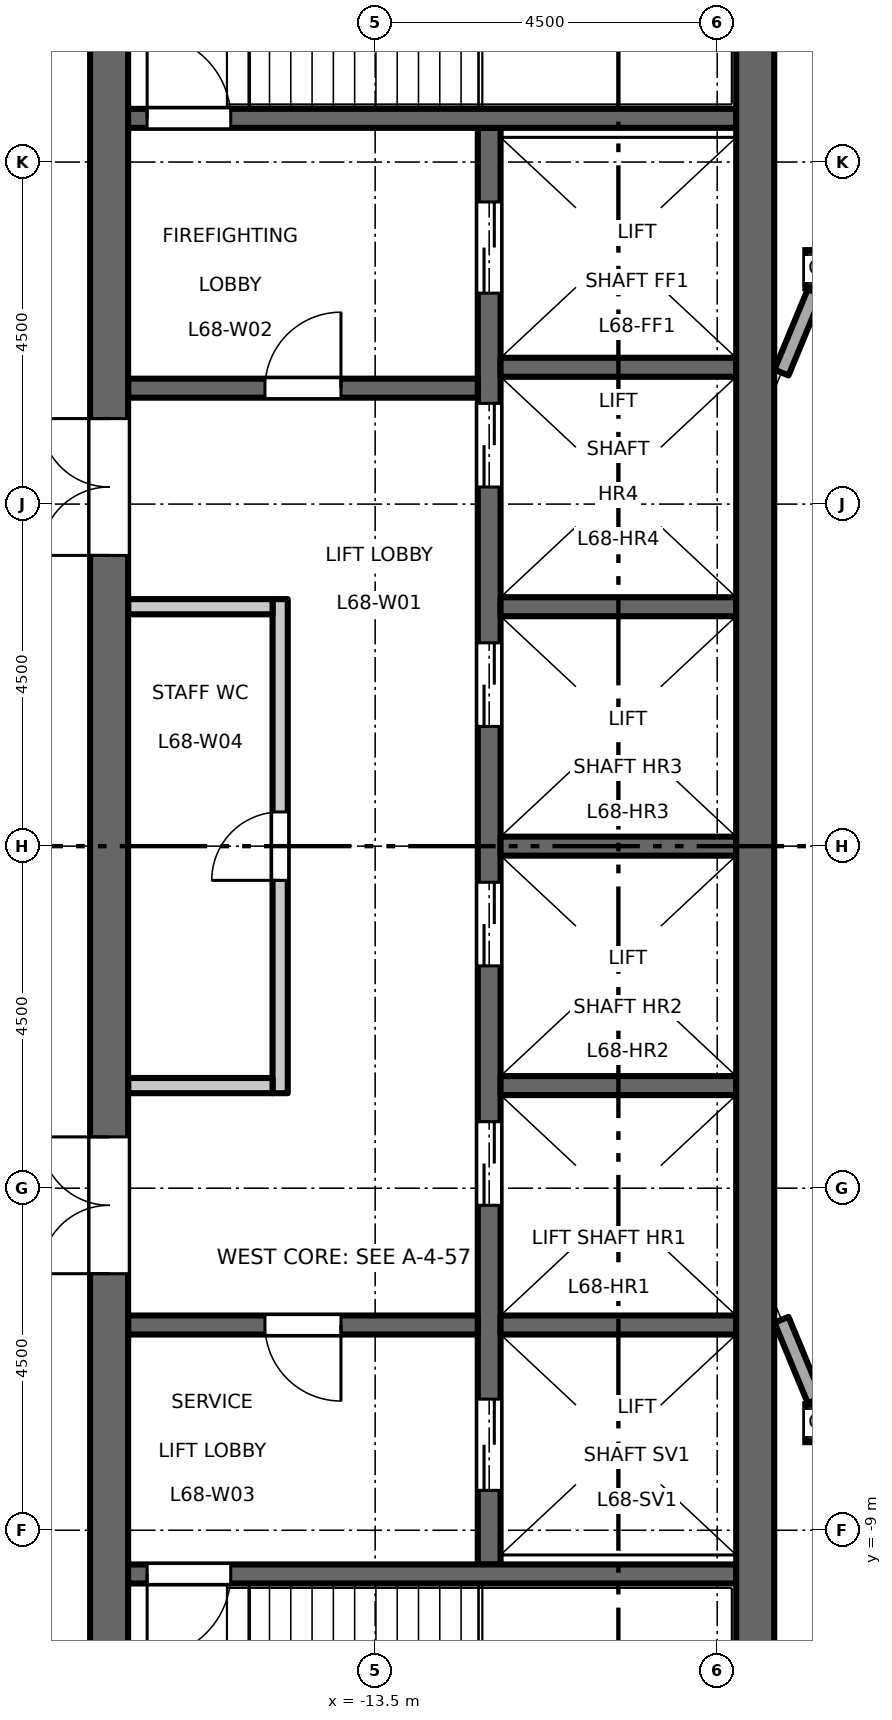
"""IFC4 building model, lengths in metres.
Left out: names, types, materials, properties, quantities, classifications, styles, units other than length and angle.
Written with IfcOpenShell. Run it as: python <this file> out.ifc"""

import sys

from ifc_helpers import new_model, si_unit, direction, frame, frame_2d, origin, origin_2d, place, context, subcontext, project, spatial, rectangle, hollow_rectangle, extrude, element, fill, save


model = new_model("IFC4")
c1 = context("Model", 3, precision=1e-05, world=origin(), true_north=direction((0.0, 1.0)))
c2 = subcontext(c1, "Body", "Model", "MODEL_VIEW")
j1 = project(units=[si_unit("LENGTHUNIT", "METRE"), si_unit("PLANEANGLEUNIT", "RADIAN")], contexts=[c1])
p1 = place(None, origin())
s1 = spatial("IfcSite", under=j1, at=p1, CompositionType="ELEMENT")
p2 = place(p1, origin())
s2 = spatial("IfcBuilding", under=s1, at=p2, CompositionType="ELEMENT")
p3 = place(p2, frame((0.0, 0.0, 316.7)))
s3 = spatial("IfcBuildingStorey", under=s2, at=p3, CompositionType="ELEMENT", Elevation=316.7)
for number, where, z_axis, x_axis in (
    (1, (-7.591, -7.591, 0.0), (0.0, 0.0, 1.0), (1.0, 0.0, 0.0)),
    (2, (-7.591, 7.591, 0.0), (0.0, 0.0, 1.0), (1.0, 0.0, 0.0)),
):
    element("IfcColumn", number, at=place(p3, frame(where, z_axis=z_axis, x_axis=x_axis)), inside=s3, PredefinedType="COLUMN", context=c2, shape_type="SweptSolid", body=[
        extrude(hollow_rectangle(XDim=0.5, YDim=0.5, WallThickness=0.025, at=origin_2d()), origin(), (0.0, 0.0, 1.0), 4.5),
    ])
p4 = place(p3, frame((-14.75, -3.25, 0.0), z_axis=(0.0, 0.0, 1.0), x_axis=(0.0, 1.0, 0.0)))
e3 = element("IfcWall", 3, at=p4, inside=s3, PredefinedType="PARTITIONING", context=c2, shape_type="SweptSolid", body=[
    extrude(rectangle(XDim=6.5, YDim=0.2, at=frame_2d((3.25, 0.0))), origin(), (0.0, 0.0, 1.0), 4.35),
])
p5 = place(p4, frame((2.8, 0.0, 0.0)))
e4 = element("IfcOpeningElement", 4, at=p5, cuts=e3, PredefinedType="OPENING", context=c2, shape_type="SweptSolid", body=[
    extrude(rectangle(XDim=0.9, YDim=2.1, at=frame_2d((0.45, 1.05))), frame((0.0, 0.11, 0.0), z_axis=(0.0, -1.0, 0.0), x_axis=(1.0, 0.0, 0.0)), (0.0, 0.0, 1.0), 0.22),
])
for number, where, z_axis, x_axis in (
    (5, (-14.85, 3.15, 0.0), (0.0, 0.0, 1.0), (-1.0, 0.0, 0.0)),
    (6, (-14.85, -3.15, 0.0), (0.0, 0.0, 1.0), (-1.0, 0.0, 0.0)),
):
    element("IfcWall", number, at=place(p3, frame(where, z_axis=z_axis, x_axis=x_axis)), inside=s3, PredefinedType="PARTITIONING", context=c2, shape_type="SweptSolid", body=[
        extrude(rectangle(XDim=1.9, YDim=0.2, at=frame_2d((0.95, 0.0))), origin(), (0.0, 0.0, 1.0), 4.35),
    ])
p6 = place(p3, frame((-12.0, -9.45, 0.0), z_axis=(0.0, 0.0, 1.0), x_axis=(0.0, 1.0, 0.0)))
e7 = element("IfcWall", 7, at=p6, inside=s3, PredefinedType="SHEAR", context=c2, shape_type="SweptSolid", body=[
    extrude(rectangle(XDim=18.9, YDim=0.3, at=frame_2d((9.45, 0.0))), origin(), (0.0, 0.0, 1.0), 4.35),
])
p7 = place(p6, frame((4.725, 0.0, 0.0)))
e8 = element("IfcOpeningElement", 8, at=p7, cuts=e7, PredefinedType="OPENING", context=c2, shape_type="SweptSolid", body=[
    extrude(rectangle(XDim=1.1, YDim=2.1, at=frame_2d((0.55, 1.05))), frame((0.0, 0.16, 0.0), z_axis=(0.0, -1.0, 0.0), x_axis=(1.0, 0.0, 0.0)), (0.0, 0.0, 1.0), 0.32),
])
p8 = place(p6, frame((7.875, 0.0, 0.0)))
e9 = element("IfcOpeningElement", 9, at=p8, cuts=e7, PredefinedType="OPENING", context=c2, shape_type="SweptSolid", body=[
    extrude(rectangle(XDim=1.1, YDim=2.1, at=frame_2d((0.55, 1.05))), frame((0.0, 0.16, 0.0), z_axis=(0.0, -1.0, 0.0), x_axis=(1.0, 0.0, 0.0)), (0.0, 0.0, 1.0), 0.32),
])
p9 = place(p6, frame((11.025, 0.0, 0.0)))
e10 = element("IfcOpeningElement", 10, at=p9, cuts=e7, PredefinedType="OPENING", context=c2, shape_type="SweptSolid", body=[
    extrude(rectangle(XDim=1.1, YDim=2.1, at=frame_2d((0.55, 1.05))), frame((0.0, 0.16, 0.0), z_axis=(0.0, -1.0, 0.0), x_axis=(1.0, 0.0, 0.0)), (0.0, 0.0, 1.0), 0.32),
])
p10 = place(p6, frame((14.175, 0.0, 0.0)))
e11 = element("IfcOpeningElement", 11, at=p10, cuts=e7, PredefinedType="OPENING", context=c2, shape_type="SweptSolid", body=[
    extrude(rectangle(XDim=1.1, YDim=2.1, at=frame_2d((0.55, 1.05))), frame((0.0, 0.16, 0.0), z_axis=(0.0, -1.0, 0.0), x_axis=(1.0, 0.0, 0.0)), (0.0, 0.0, 1.0), 0.32),
])
p11 = place(p6, frame((16.725, 0.0, 0.0)))
e12 = element("IfcOpeningElement", 12, at=p11, cuts=e7, PredefinedType="OPENING", context=c2, shape_type="SweptSolid", body=[
    extrude(rectangle(XDim=1.2, YDim=2.1, at=frame_2d((0.6, 1.05))), frame((0.0, 0.16, 0.0), z_axis=(0.0, -1.0, 0.0), x_axis=(1.0, 0.0, 0.0)), (0.0, 0.0, 1.0), 0.32),
])
p12 = place(p6, frame((0.975, 0.0, 0.0)))
e13 = element("IfcOpeningElement", 13, at=p12, cuts=e7, PredefinedType="OPENING", context=c2, shape_type="SweptSolid", body=[
    extrude(rectangle(XDim=1.2, YDim=2.1, at=frame_2d((0.6, 1.05))), frame((0.0, 0.16, 0.0), z_axis=(0.0, -1.0, 0.0), x_axis=(1.0, 0.0, 0.0)), (0.0, 0.0, 1.0), 0.32),
])
p13 = place(p3, frame((-12.15, 6.025, 0.0), z_axis=(0.0, 0.0, 1.0), x_axis=(-1.0, 0.0, 0.0)))
e14 = element("IfcWall", 14, at=p13, inside=s3, PredefinedType="SHEAR", context=c2, shape_type="SweptSolid", body=[
    extrude(rectangle(XDim=4.6, YDim=0.25, at=frame_2d((2.3, 0.0))), origin(), (0.0, 0.0, 1.0), 4.35),
])
p14 = place(p13, frame((1.8, 0.0, 0.0)))
e15 = element("IfcOpeningElement", 15, at=p14, cuts=e14, PredefinedType="OPENING", context=c2, shape_type="SweptSolid", body=[
    extrude(rectangle(XDim=1.0, YDim=2.1, at=frame_2d((0.5, 1.05))), frame((0.0, 0.135, 0.0), z_axis=(0.0, -1.0, 0.0), x_axis=(1.0, 0.0, 0.0)), (0.0, 0.0, 1.0), 0.27),
])
p15 = place(p3, frame((-12.15, -6.3, 0.0), z_axis=(0.0, 0.0, 1.0), x_axis=(-1.0, 0.0, 0.0)))
e16 = element("IfcWall", 16, at=p15, inside=s3, PredefinedType="SHEAR", context=c2, shape_type="SweptSolid", body=[
    extrude(rectangle(XDim=4.6, YDim=0.25, at=frame_2d((2.3, 0.0))), origin(), (0.0, 0.0, 1.0), 4.35),
])
p16 = place(p15, frame((1.8, 0.0, 0.0)))
e17 = element("IfcOpeningElement", 17, at=p16, cuts=e16, PredefinedType="OPENING", context=c2, shape_type="SweptSolid", body=[
    extrude(rectangle(XDim=1.0, YDim=2.1, at=frame_2d((0.5, 1.05))), frame((0.0, 0.135, 0.0), z_axis=(0.0, -1.0, 0.0), x_axis=(1.0, 0.0, 0.0)), (0.0, 0.0, 1.0), 0.27),
])
p17 = place(p3, frame((-17.0, -13.0, 0.0), z_axis=(0.0, 0.0, 1.0), x_axis=(0.0, 1.0, 0.0)))
e18 = element("IfcWall", 18, at=p17, inside=s3, PredefinedType="SHEAR", context=c2, shape_type="SweptSolid", body=[
    extrude(rectangle(XDim=26.0, YDim=0.5, at=frame_2d((13.0, 0.0))), origin(), (0.0, 0.0, 1.0), 4.35),
])
p18 = place(p17, frame((16.825, 0.0, 0.0)))
e19 = element("IfcOpeningElement", 19, at=p18, cuts=e18, PredefinedType="OPENING", context=c2, shape_type="SweptSolid", body=[
    extrude(rectangle(XDim=1.8, YDim=2.1, at=frame_2d((0.9, 1.05))), frame((0.0, 0.26, 0.0), z_axis=(0.0, -1.0, 0.0), x_axis=(1.0, 0.0, 0.0)), (0.0, 0.0, 1.0), 0.52),
])
p19 = place(p17, frame((7.375, 0.0, 0.0)))
e20 = element("IfcOpeningElement", 20, at=p19, cuts=e18, PredefinedType="OPENING", context=c2, shape_type="SweptSolid", body=[
    extrude(rectangle(XDim=1.8, YDim=2.1, at=frame_2d((0.9, 1.05))), frame((0.0, 0.26, 0.0), z_axis=(0.0, -1.0, 0.0), x_axis=(1.0, 0.0, 0.0)), (0.0, 0.0, 1.0), 0.52),
])
for number, where, z_axis, x_axis in (
    (21, (-8.75, 0.0, 0.0), (0.0, 0.0, 1.0), (-1.0, 0.0, 0.0)),
    (22, (-8.75, 3.15, 0.0), (0.0, 0.0, 1.0), (-1.0, 0.0, 0.0)),
    (23, (-8.75, 6.3, 0.0), (0.0, 0.0, 1.0), (-1.0, 0.0, 0.0)),
    (24, (-8.75, -3.15, 0.0), (0.0, 0.0, 1.0), (-1.0, 0.0, 0.0)),
    (25, (-8.75, -6.3, 0.0), (0.0, 0.0, 1.0), (-1.0, 0.0, 0.0)),
):
    element("IfcWall", number, at=place(p3, frame(where, z_axis=z_axis, x_axis=x_axis)), inside=s3, PredefinedType="SHEAR", context=c2, shape_type="SweptSolid", body=[
        extrude(rectangle(XDim=3.1, YDim=0.25, at=frame_2d((1.55, 0.0))), origin(), (0.0, 0.0, 1.0), 4.35),
    ])
p20 = place(p3, frame((-8.75, 9.575, 0.0), z_axis=(0.0, 0.0, 1.0), x_axis=(-1.0, 0.0, 0.0)))
e26 = element("IfcWall", 26, at=p20, inside=s3, PredefinedType="SHEAR", context=c2, shape_type="SweptSolid", body=[
    extrude(rectangle(XDim=8.0, YDim=0.25, at=frame_2d((4.0, 0.0))), origin(), (0.0, 0.0, 1.0), 4.35),
])
p21 = place(p20, frame((6.65, 0.0, 0.0)))
e27 = element("IfcOpeningElement", 27, at=p21, cuts=e26, PredefinedType="OPENING", context=c2, shape_type="SweptSolid", body=[
    extrude(rectangle(XDim=1.1, YDim=2.1, at=frame_2d((0.55, 1.05))), frame((0.0, 0.135, 0.0), z_axis=(0.0, -1.0, 0.0), x_axis=(1.0, 0.0, 0.0)), (0.0, 0.0, 1.0), 0.27),
])
p22 = place(p3, frame((-8.75, -9.575, 0.0), z_axis=(0.0, 0.0, 1.0), x_axis=(-1.0, 0.0, 0.0)))
e28 = element("IfcWall", 28, at=p22, inside=s3, PredefinedType="SHEAR", context=c2, shape_type="SweptSolid", body=[
    extrude(rectangle(XDim=8.0, YDim=0.25, at=frame_2d((4.0, 0.0))), origin(), (0.0, 0.0, 1.0), 4.35),
])
p23 = place(p22, frame((6.65, 0.0, 0.0)))
e29 = element("IfcOpeningElement", 29, at=p23, cuts=e28, PredefinedType="OPENING", context=c2, shape_type="SweptSolid", body=[
    extrude(rectangle(XDim=1.1, YDim=2.1, at=frame_2d((0.55, 1.05))), frame((0.0, 0.135, 0.0), z_axis=(0.0, -1.0, 0.0), x_axis=(1.0, 0.0, 0.0)), (0.0, 0.0, 1.0), 0.27),
])
p24 = place(p3, frame((-8.5, -13.0, 0.0), z_axis=(0.0, 0.0, 1.0), x_axis=(0.0, 1.0, 0.0)))
e30 = element("IfcWall", 30, at=p24, inside=s3, PredefinedType="SHEAR", context=c2, shape_type="SweptSolid", body=[
    extrude(rectangle(XDim=26.0, YDim=0.5, at=frame_2d((13.0, 0.0))), origin(), (0.0, 0.0, 1.0), 4.35),
])
for number, where, z_axis, x_axis in (
    (31, (-7.716, 7.289, 0.0), (0.0, 0.0, 1.0), (-0.383, -0.924, 0.0)),
    (32, (-8.154, -6.231, 0.0), (0.0, 0.0, 1.0), (0.383, -0.924, 0.0)),
):
    element("IfcWall", number, at=place(p3, frame(where, z_axis=z_axis, x_axis=x_axis)), inside=s3, PredefinedType="STANDARD", context=c2, shape_type="SweptSolid", body=[
        extrude(rectangle(XDim=1.146, YDim=0.2, at=frame_2d((0.573, 0.0))), origin(), (0.0, 0.0, 1.0), 4.01),
    ])
p25 = place(p14, origin())
e33 = element("IfcDoor", 33, at=p25, inside=s3, OperationType="SINGLE_SWING_LEFT", PredefinedType="DOOR", context=c2, shape_type="SweptSolid", body=[
    extrude(rectangle(XDim=1.0, YDim=2.1, at=frame_2d((0.5, 1.05))), frame((0.0, 0.025, 0.0), z_axis=(0.0, -1.0, 0.0), x_axis=(1.0, 0.0, 0.0)), (0.0, 0.0, 1.0), 0.05),
])
fill(e15, e33)
p26 = place(p16, origin())
e34 = element("IfcDoor", 34, at=p26, inside=s3, OperationType="SINGLE_SWING_RIGHT", PredefinedType="DOOR", context=c2, shape_type="SweptSolid", body=[
    extrude(rectangle(XDim=1.0, YDim=2.1, at=frame_2d((0.5, 1.05))), frame((0.0, 0.025, 0.0), z_axis=(0.0, -1.0, 0.0), x_axis=(1.0, 0.0, 0.0)), (0.0, 0.0, 1.0), 0.05),
])
fill(e17, e34)
p27 = place(p21, origin())
e35 = element("IfcDoor", 35, at=p27, inside=s3, OperationType="SINGLE_SWING_RIGHT", PredefinedType="DOOR", context=c2, shape_type="SweptSolid", body=[
    extrude(rectangle(XDim=1.1, YDim=2.1, at=frame_2d((0.55, 1.05))), frame((0.0, 0.025, 0.0), z_axis=(0.0, -1.0, 0.0), x_axis=(1.0, 0.0, 0.0)), (0.0, 0.0, 1.0), 0.05),
])
fill(e27, e35)
p28 = place(p23, origin())
e36 = element("IfcDoor", 36, at=p28, inside=s3, OperationType="SINGLE_SWING_LEFT", PredefinedType="DOOR", context=c2, shape_type="SweptSolid", body=[
    extrude(rectangle(XDim=1.1, YDim=2.1, at=frame_2d((0.55, 1.05))), frame((0.0, 0.025, 0.0), z_axis=(0.0, -1.0, 0.0), x_axis=(1.0, 0.0, 0.0)), (0.0, 0.0, 1.0), 0.05),
])
fill(e29, e36)
p29 = place(p18, origin())
e37 = element("IfcDoor", 37, at=p29, inside=s3, OperationType="DOUBLE_DOOR_DOUBLE_SWING", PredefinedType="DOOR", context=c2, shape_type="SweptSolid", body=[
    extrude(rectangle(XDim=1.8, YDim=2.1, at=frame_2d((0.9, 1.05))), frame((0.0, 0.025, 0.0), z_axis=(0.0, -1.0, 0.0), x_axis=(1.0, 0.0, 0.0)), (0.0, 0.0, 1.0), 0.05),
])
fill(e19, e37)
p30 = place(p19, origin())
e38 = element("IfcDoor", 38, at=p30, inside=s3, OperationType="DOUBLE_DOOR_DOUBLE_SWING", PredefinedType="DOOR", context=c2, shape_type="SweptSolid", body=[
    extrude(rectangle(XDim=1.8, YDim=2.1, at=frame_2d((0.9, 1.05))), frame((0.0, 0.025, 0.0), z_axis=(0.0, -1.0, 0.0), x_axis=(1.0, 0.0, 0.0)), (0.0, 0.0, 1.0), 0.05),
])
fill(e20, e38)
p31 = place(p7, origin())
e39 = element("IfcDoor", 39, at=p31, inside=s3, OperationType="DOUBLE_DOOR_SLIDING", PredefinedType="DOOR", context=c2, shape_type="SweptSolid", body=[
    extrude(rectangle(XDim=1.1, YDim=2.1, at=frame_2d((0.55, 1.05))), frame((0.0, 0.025, 0.0), z_axis=(0.0, -1.0, 0.0), x_axis=(1.0, 0.0, 0.0)), (0.0, 0.0, 1.0), 0.05),
])
fill(e8, e39)
p32 = place(p8, origin())
e40 = element("IfcDoor", 40, at=p32, inside=s3, OperationType="DOUBLE_DOOR_SLIDING", PredefinedType="DOOR", context=c2, shape_type="SweptSolid", body=[
    extrude(rectangle(XDim=1.1, YDim=2.1, at=frame_2d((0.55, 1.05))), frame((0.0, 0.025, 0.0), z_axis=(0.0, -1.0, 0.0), x_axis=(1.0, 0.0, 0.0)), (0.0, 0.0, 1.0), 0.05),
])
fill(e9, e40)
p33 = place(p9, origin())
e41 = element("IfcDoor", 41, at=p33, inside=s3, OperationType="DOUBLE_DOOR_SLIDING", PredefinedType="DOOR", context=c2, shape_type="SweptSolid", body=[
    extrude(rectangle(XDim=1.1, YDim=2.1, at=frame_2d((0.55, 1.05))), frame((0.0, 0.025, 0.0), z_axis=(0.0, -1.0, 0.0), x_axis=(1.0, 0.0, 0.0)), (0.0, 0.0, 1.0), 0.05),
])
fill(e10, e41)
p34 = place(p10, origin())
e42 = element("IfcDoor", 42, at=p34, inside=s3, OperationType="DOUBLE_DOOR_SLIDING", PredefinedType="DOOR", context=c2, shape_type="SweptSolid", body=[
    extrude(rectangle(XDim=1.1, YDim=2.1, at=frame_2d((0.55, 1.05))), frame((0.0, 0.025, 0.0), z_axis=(0.0, -1.0, 0.0), x_axis=(1.0, 0.0, 0.0)), (0.0, 0.0, 1.0), 0.05),
])
fill(e11, e42)
p35 = place(p11, origin())
e43 = element("IfcDoor", 43, at=p35, inside=s3, OperationType="DOUBLE_DOOR_SLIDING", PredefinedType="DOOR", context=c2, shape_type="SweptSolid", body=[
    extrude(rectangle(XDim=1.2, YDim=2.1, at=frame_2d((0.6, 1.05))), frame((0.0, 0.025, 0.0), z_axis=(0.0, -1.0, 0.0), x_axis=(1.0, 0.0, 0.0)), (0.0, 0.0, 1.0), 0.05),
])
fill(e12, e43)
p36 = place(p12, origin())
e44 = element("IfcDoor", 44, at=p36, inside=s3, OperationType="DOUBLE_DOOR_SLIDING", PredefinedType="DOOR", context=c2, shape_type="SweptSolid", body=[
    extrude(rectangle(XDim=1.2, YDim=2.1, at=frame_2d((0.6, 1.05))), frame((0.0, 0.025, 0.0), z_axis=(0.0, -1.0, 0.0), x_axis=(1.0, 0.0, 0.0)), (0.0, 0.0, 1.0), 0.05),
])
fill(e13, e44)
p37 = place(p5, origin())
e45 = element("IfcDoor", 45, at=p37, inside=s3, OperationType="SINGLE_SWING_RIGHT", PredefinedType="DOOR", context=c2, shape_type="SweptSolid", body=[
    extrude(rectangle(XDim=0.9, YDim=2.1, at=frame_2d((0.45, 1.05))), frame((0.0, 0.025, 0.0), z_axis=(0.0, -1.0, 0.0), x_axis=(1.0, 0.0, 0.0)), (0.0, 0.0, 1.0), 0.05),
])
fill(e4, e45)
save(model, sys.argv[1])
